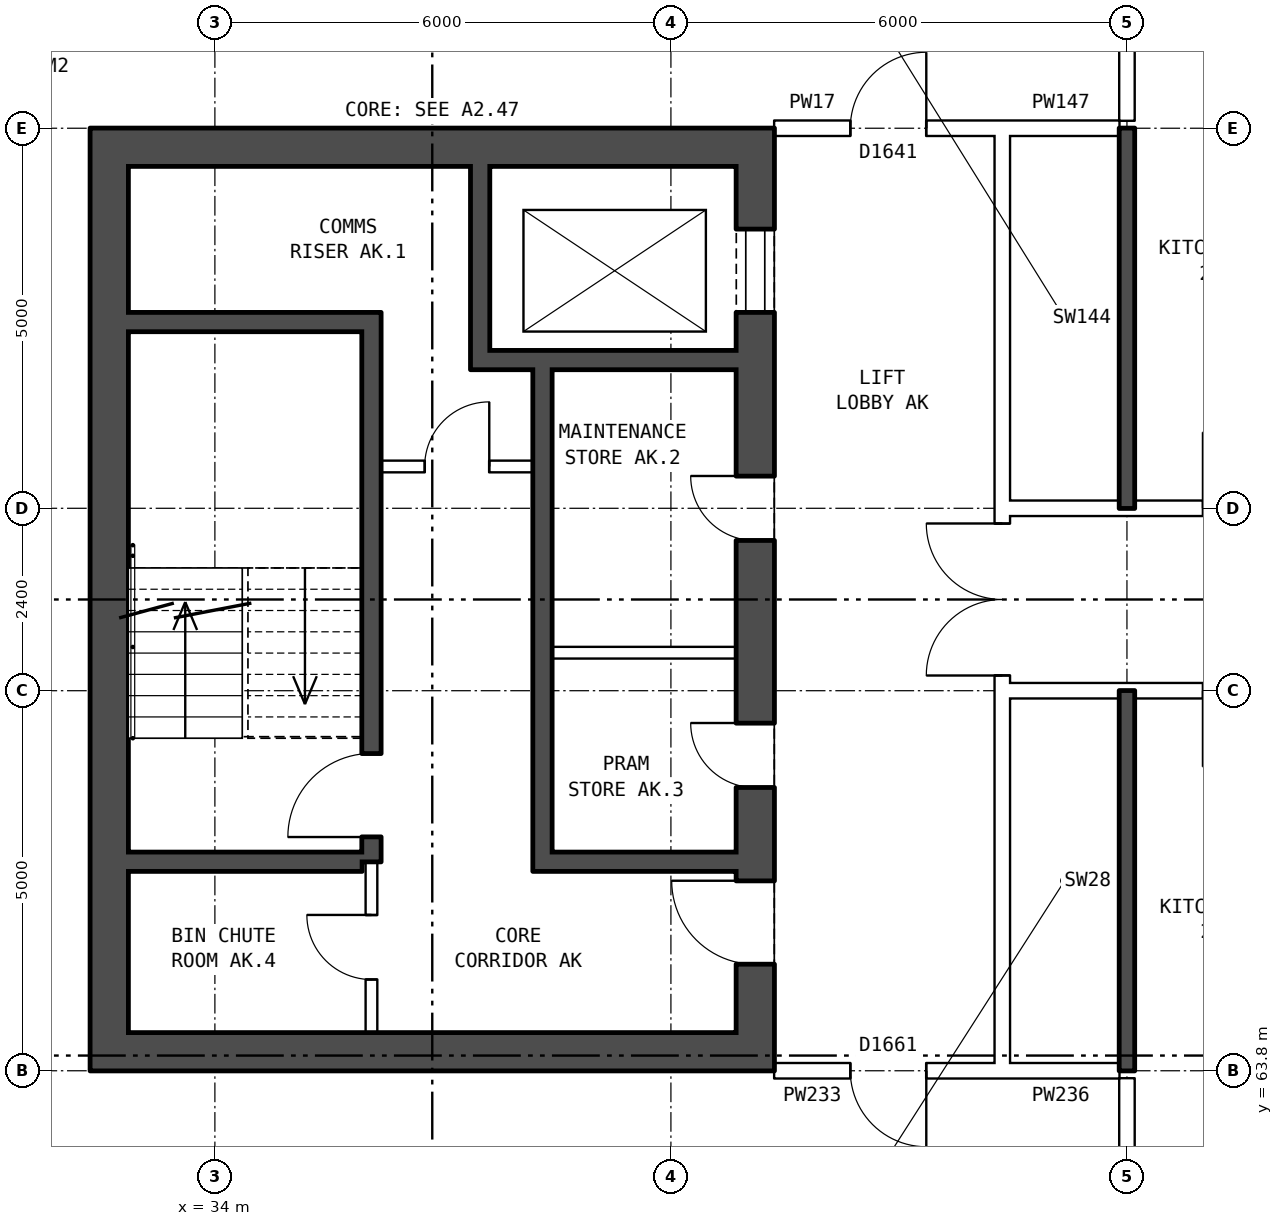
"""IFC4 building model, lengths in metres.
Left out: names, types, materials, properties, quantities, classifications, styles, units other than length and angle.
Written with IfcOpenShell. Run it as: python <this file> out.ifc"""

import sys

from ifc_helpers import new_model, si_unit, direction, frame, frame_2d, origin, place, context, subcontext, project, spatial, rectangle, extrude, element, fill, save


model = new_model("IFC4")
c1 = context("Model", 3, precision=1e-05, world=origin(), true_north=direction((0.0, 1.0)))
c2 = subcontext(c1, "Body", "Model", "MODEL_VIEW")
j1 = project(units=[si_unit("LENGTHUNIT", "METRE"), si_unit("PLANEANGLEUNIT", "RADIAN")], contexts=[c1])
p1 = place(None, origin())
s1 = spatial("IfcSite", under=j1, at=p1, CompositionType="ELEMENT")
p2 = place(p1, origin())
s2 = spatial("IfcBuilding", under=s1, at=p2, CompositionType="ELEMENT")
p3 = place(p2, frame((0.0, 0.0, 164.0)))
s3 = spatial("IfcBuildingStorey", under=s2, at=p3, CompositionType="ELEMENT", Elevation=164.0)
p4 = place(p3, frame((41.11, 76.2, 0.0), z_axis=(0.0, 0.0, 1.0), x_axis=(0.0, -1.0, 0.0)))
e1 = element("IfcWall", 1, at=p4, inside=s3, PredefinedType="SHEAR", context=c2, shape_type="SweptSolid", body=[
    extrude(rectangle(XDim=12.4, YDim=0.5, at=frame_2d((6.2, 0.0))), origin(), (0.0, 0.0, 1.0), 2.85),
])
p5 = place(p4, frame((1.325, 0.0, 0.0)))
e2 = element("IfcOpeningElement", 2, at=p5, cuts=e1, PredefinedType="OPENING", context=c2, shape_type="SweptSolid", body=[
    extrude(rectangle(XDim=1.1, YDim=2.1, at=frame_2d((0.55, 1.05))), frame((0.0, 0.26, 0.0), z_axis=(0.0, -1.0, 0.0), x_axis=(1.0, 0.0, 0.0)), (0.0, 0.0, 1.0), 0.52),
])
p6 = place(p4, frame((4.575, 0.0, 0.0)))
e3 = element("IfcOpeningElement", 3, at=p6, cuts=e1, PredefinedType="OPENING", context=c2, shape_type="SweptSolid", body=[
    extrude(rectangle(XDim=0.85, YDim=2.1, at=frame_2d((0.425, 1.05))), frame((0.0, 0.26, 0.0), z_axis=(0.0, -1.0, 0.0), x_axis=(1.0, 0.0, 0.0)), (0.0, 0.0, 1.0), 0.52),
])
p7 = place(p4, frame((7.825, 0.0, 0.0)))
e4 = element("IfcOpeningElement", 4, at=p7, cuts=e1, PredefinedType="OPENING", context=c2, shape_type="SweptSolid", body=[
    extrude(rectangle(XDim=0.85, YDim=2.1, at=frame_2d((0.425, 1.05))), frame((0.0, 0.26, 0.0), z_axis=(0.0, -1.0, 0.0), x_axis=(1.0, 0.0, 0.0)), (0.0, 0.0, 1.0), 0.52),
])
p8 = place(p4, frame((9.9, 0.0, 0.0)))
e5 = element("IfcOpeningElement", 5, at=p8, cuts=e1, PredefinedType="OPENING", context=c2, shape_type="SweptSolid", body=[
    extrude(rectangle(XDim=1.1, YDim=2.1, at=frame_2d((0.55, 1.05))), frame((0.0, 0.26, 0.0), z_axis=(0.0, -1.0, 0.0), x_axis=(1.0, 0.0, 0.0)), (0.0, 0.0, 1.0), 0.52),
])
p9 = place(p3, frame((32.61, 76.2, 0.0), z_axis=(0.0, 0.0, 1.0), x_axis=(0.0, -1.0, 0.0)))
e6 = element("IfcWall", 6, at=p9, inside=s3, PredefinedType="SHEAR", context=c2, shape_type="SweptSolid", body=[
    extrude(rectangle(XDim=12.4, YDim=0.5, at=frame_2d((6.2, 0.0))), origin(), (0.0, 0.0, 1.0), 2.85),
])
for number, where, z_axis, x_axis in (
    (7, (40.86, 75.95, 0.0), (0.0, 0.0, 1.0), (-1.0, 0.0, 0.0)),
    (8, (40.86, 64.05, 0.0), (0.0, 0.0, 1.0), (-1.0, 0.0, 0.0)),
):
    element("IfcWall", number, at=place(p3, frame(where, z_axis=z_axis, x_axis=x_axis)), inside=s3, PredefinedType="SHEAR", context=c2, shape_type="SweptSolid", body=[
        extrude(rectangle(XDim=8.0, YDim=0.5, at=frame_2d((4.0, 0.0))), origin(), (0.0, 0.0, 1.0), 2.85),
    ])
p10 = place(p3, frame((35.935, 73.65, 0.0), z_axis=(0.0, 0.0, 1.0), x_axis=(-1.0, 0.0, 0.0)))
e9 = element("IfcWall", 9, at=p10, inside=s3, PredefinedType="SHEAR", context=c2, shape_type="SweptSolid", body=[
    extrude(rectangle(XDim=3.075, YDim=0.25, at=frame_2d((1.538, 0.0))), origin(), (0.0, 0.0, 1.0), 2.85),
])
p11 = place(p3, frame((40.86, 73.15, 0.0), z_axis=(0.0, 0.0, 1.0), x_axis=(-1.0, 0.0, 0.0)))
e10 = element("IfcWall", 10, at=p11, inside=s3, PredefinedType="SHEAR", context=c2, shape_type="SweptSolid", body=[
    extrude(rectangle(XDim=3.495, YDim=0.25, at=frame_2d((1.748, 0.0))), origin(), (0.0, 0.0, 1.0), 2.85),
])
p12 = place(p3, frame((38.185, 71.75, 0.0), z_axis=(0.0, 0.0, 1.0), x_axis=(-1.0, 0.0, 0.0)))
e11 = element("IfcWall", 11, at=p12, inside=s3, PredefinedType="PARTITIONING", context=c2, shape_type="SweptSolid", body=[
    extrude(rectangle(XDim=2.0, YDim=0.15, at=frame_2d((1.0, 0.0))), origin(), (0.0, 0.0, 1.0), 2.85),
])
p13 = place(p12, frame((0.575, 0.0, 0.0)))
e12 = element("IfcOpeningElement", 12, at=p13, cuts=e11, PredefinedType="OPENING", context=c2, shape_type="SweptSolid", body=[
    extrude(rectangle(XDim=0.85, YDim=2.1, at=frame_2d((0.425, 1.05))), frame((0.0, 0.085, 0.0), z_axis=(0.0, -1.0, 0.0), x_axis=(1.0, 0.0, 0.0)), (0.0, 0.0, 1.0), 0.17),
])
p14 = place(p3, frame((40.86, 69.3, 0.0), z_axis=(0.0, 0.0, 1.0), x_axis=(-1.0, 0.0, 0.0)))
e13 = element("IfcWall", 13, at=p14, inside=s3, PredefinedType="PARTITIONING", context=c2, shape_type="SweptSolid", body=[
    extrude(rectangle(XDim=2.425, YDim=0.15, at=frame_2d((1.212, 0.0))), origin(), (0.0, 0.0, 1.0), 2.85),
])
p15 = place(p3, frame((40.86, 66.55, 0.0), z_axis=(0.0, 0.0, 1.0), x_axis=(-1.0, 0.0, 0.0)))
e14 = element("IfcWall", 14, at=p15, inside=s3, PredefinedType="SHEAR", context=c2, shape_type="SweptSolid", body=[
    extrude(rectangle(XDim=2.425, YDim=0.25, at=frame_2d((1.212, 0.0))), origin(), (0.0, 0.0, 1.0), 2.85),
])
p16 = place(p3, frame((35.935, 66.55, 0.0), z_axis=(0.0, 0.0, 1.0), x_axis=(-1.0, 0.0, 0.0)))
e15 = element("IfcWall", 15, at=p16, inside=s3, PredefinedType="SHEAR", context=c2, shape_type="SweptSolid", body=[
    extrude(rectangle(XDim=3.075, YDim=0.25, at=frame_2d((1.538, 0.0))), origin(), (0.0, 0.0, 1.0), 2.85),
])
p17 = place(p3, frame((38.31, 73.025, 0.0), z_axis=(0.0, 0.0, 1.0), x_axis=(0.0, -1.0, 0.0)))
e16 = element("IfcWall", 16, at=p17, inside=s3, PredefinedType="SHEAR", context=c2, shape_type="SweptSolid", body=[
    extrude(rectangle(XDim=6.6, YDim=0.25, at=frame_2d((3.3, 0.0))), origin(), (0.0, 0.0, 1.0), 2.85),
])
p18 = place(p3, frame((37.49, 75.7, 0.0), z_axis=(0.0, 0.0, 1.0), x_axis=(0.0, -1.0, 0.0)))
e17 = element("IfcWall", 17, at=p18, inside=s3, PredefinedType="SHEAR", context=c2, shape_type="SweptSolid", body=[
    extrude(rectangle(XDim=2.425, YDim=0.25, at=frame_2d((1.212, 0.0))), origin(), (0.0, 0.0, 1.0), 2.85),
])
p19 = place(p3, frame((36.06, 73.775, 0.0), z_axis=(0.0, 0.0, 1.0), x_axis=(0.0, -1.0, 0.0)))
e18 = element("IfcWall", 18, at=p19, inside=s3, PredefinedType="SHEAR", context=c2, shape_type="SweptSolid", body=[
    extrude(rectangle(XDim=7.225, YDim=0.25, at=frame_2d((3.612, 0.0))), origin(), (0.0, 0.0, 1.0), 2.85),
])
p20 = place(p19, frame((5.8, 0.0, 0.0)))
e19 = element("IfcOpeningElement", 19, at=p20, cuts=e18, PredefinedType="OPENING", context=c2, shape_type="SweptSolid", body=[
    extrude(rectangle(XDim=1.1, YDim=2.1, at=frame_2d((0.55, 1.05))), frame((0.0, 0.135, 0.0), z_axis=(0.0, -1.0, 0.0), x_axis=(1.0, 0.0, 0.0)), (0.0, 0.0, 1.0), 0.27),
])
p21 = place(p3, frame((36.06, 66.55, 0.0), z_axis=(0.0, 0.0, 1.0), x_axis=(0.0, -1.0, 0.0)))
e20 = element("IfcWall", 20, at=p21, inside=s3, PredefinedType="PARTITIONING", context=c2, shape_type="SweptSolid", body=[
    extrude(rectangle(XDim=2.25, YDim=0.15, at=frame_2d((1.125, 0.0))), origin(), (0.0, 0.0, 1.0), 2.85),
])
p22 = place(p21, frame((0.7, 0.0, 0.0)))
e21 = element("IfcOpeningElement", 21, at=p22, cuts=e20, PredefinedType="OPENING", context=c2, shape_type="SweptSolid", body=[
    extrude(rectangle(XDim=0.85, YDim=2.1, at=frame_2d((0.425, 1.05))), frame((0.0, 0.085, 0.0), z_axis=(0.0, -1.0, 0.0), x_axis=(1.0, 0.0, 0.0)), (0.0, 0.0, 1.0), 0.17),
])
p23 = place(p3, frame((44.36, 63.9, 0.0), z_axis=(0.0, 0.0, 1.0), x_axis=(0.0, 1.0, 0.0)))
e22 = element("IfcWall", 22, at=p23, inside=s3, PredefinedType="PARTITIONING", context=c2, shape_type="SweptSolid", body=[
    extrude(rectangle(XDim=12.2, YDim=0.2, at=frame_2d((6.1, 0.0))), origin(), (0.0, 0.0, 1.0), 2.85),
])
p24 = place(p23, frame((5.1, 0.0, 0.0)))
e23 = element("IfcOpeningElement", 23, at=p24, cuts=e22, PredefinedType="OPENING", context=c2, shape_type="SweptSolid", body=[
    extrude(rectangle(XDim=2.0, YDim=2.1, at=frame_2d((1.0, 1.05))), frame((0.0, 0.11, 0.0), z_axis=(0.0, -1.0, 0.0), x_axis=(1.0, 0.0, 0.0)), (0.0, 0.0, 1.0), 0.22),
])
p25 = place(p3, frame((41.36, 63.8, 0.0), z_axis=(0.0, 0.0, 1.0), x_axis=(1.0, 0.0, 0.0)))
e24 = element("IfcWall", 24, at=p25, inside=s3, PredefinedType="PARTITIONING", context=c2, shape_type="SweptSolid", body=[
    extrude(rectangle(XDim=3.0, YDim=0.2, at=frame_2d((1.5, 0.0))), origin(), (0.0, 0.0, 1.0), 2.85),
])
p26 = place(p25, frame((1.0, 0.0, 0.0)))
e25 = element("IfcOpeningElement", 25, at=p26, cuts=e24, PredefinedType="OPENING", context=c2, shape_type="SweptSolid", body=[
    extrude(rectangle(XDim=1.0, YDim=2.1, at=frame_2d((0.5, 1.05))), frame((0.0, 0.11, 0.0), z_axis=(0.0, -1.0, 0.0), x_axis=(1.0, 0.0, 0.0)), (0.0, 0.0, 1.0), 0.22),
])
p27 = place(p3, frame((44.36, 63.8, 0.0), z_axis=(0.0, 0.0, 1.0), x_axis=(1.0, 0.0, 0.0)))
e26 = element("IfcWall", 26, at=p27, inside=s3, PredefinedType="PARTITIONING", context=c2, shape_type="SweptSolid", body=[
    extrude(rectangle(XDim=1.54, YDim=0.2, at=frame_2d((0.77, 0.0))), origin(), (0.0, 0.0, 1.0), 2.85),
])
p28 = place(p3, frame((44.36, 68.8, 0.0), z_axis=(0.0, 0.0, 1.0), x_axis=(1.0, 0.0, 0.0)))
e27 = element("IfcWall", 27, at=p28, inside=s3, PredefinedType="PARTITIONING", context=c2, shape_type="SweptSolid", body=[
    extrude(rectangle(XDim=19.28, YDim=0.2, at=frame_2d((9.64, 0.0))), origin(), (0.0, 0.0, 1.0), 2.85),
])
p29 = place(p28, frame((17.46, 0.0, 0.0)))
e28 = element("IfcOpeningElement", 28, at=p29, cuts=e27, PredefinedType="OPENING", context=c2, shape_type="SweptSolid", body=[
    extrude(rectangle(XDim=1.0, YDim=2.1, at=frame_2d((0.5, 1.05))), frame((0.0, 0.11, 0.0), z_axis=(0.0, -1.0, 0.0), x_axis=(1.0, 0.0, 0.0)), (0.0, 0.0, 1.0), 0.22),
])
p30 = place(p28, frame((8.64, 0.0, 0.0)))
e29 = element("IfcOpeningElement", 29, at=p30, cuts=e27, PredefinedType="OPENING", context=c2, shape_type="SweptSolid", body=[
    extrude(rectangle(XDim=1.0, YDim=2.1, at=frame_2d((0.5, 1.05))), frame((0.0, 0.11, 0.0), z_axis=(0.0, -1.0, 0.0), x_axis=(1.0, 0.0, 0.0)), (0.0, 0.0, 1.0), 0.22),
])
p31 = place(p28, frame((2.64, 0.0, 0.0)))
e30 = element("IfcOpeningElement", 30, at=p31, cuts=e27, PredefinedType="OPENING", context=c2, shape_type="SweptSolid", body=[
    extrude(rectangle(XDim=1.0, YDim=2.1, at=frame_2d((0.5, 1.05))), frame((0.0, 0.11, 0.0), z_axis=(0.0, -1.0, 0.0), x_axis=(1.0, 0.0, 0.0)), (0.0, 0.0, 1.0), 0.22),
])
p32 = place(p3, frame((44.36, 71.2, 0.0), z_axis=(0.0, 0.0, 1.0), x_axis=(1.0, 0.0, 0.0)))
e31 = element("IfcWall", 31, at=p32, inside=s3, PredefinedType="PARTITIONING", context=c2, shape_type="SweptSolid", body=[
    extrude(rectangle(XDim=19.28, YDim=0.2, at=frame_2d((9.64, 0.0))), origin(), (0.0, 0.0, 1.0), 2.85),
])
p33 = place(p32, frame((17.46, 0.0, 0.0)))
e32 = element("IfcOpeningElement", 32, at=p33, cuts=e31, PredefinedType="OPENING", context=c2, shape_type="SweptSolid", body=[
    extrude(rectangle(XDim=1.0, YDim=2.1, at=frame_2d((0.5, 1.05))), frame((0.0, 0.11, 0.0), z_axis=(0.0, -1.0, 0.0), x_axis=(1.0, 0.0, 0.0)), (0.0, 0.0, 1.0), 0.22),
])
p34 = place(p32, frame((8.64, 0.0, 0.0)))
e33 = element("IfcOpeningElement", 33, at=p34, cuts=e31, PredefinedType="OPENING", context=c2, shape_type="SweptSolid", body=[
    extrude(rectangle(XDim=1.0, YDim=2.1, at=frame_2d((0.5, 1.05))), frame((0.0, 0.11, 0.0), z_axis=(0.0, -1.0, 0.0), x_axis=(1.0, 0.0, 0.0)), (0.0, 0.0, 1.0), 0.22),
])
p35 = place(p32, frame((2.64, 0.0, 0.0)))
e34 = element("IfcOpeningElement", 34, at=p35, cuts=e31, PredefinedType="OPENING", context=c2, shape_type="SweptSolid", body=[
    extrude(rectangle(XDim=1.0, YDim=2.1, at=frame_2d((0.5, 1.05))), frame((0.0, 0.11, 0.0), z_axis=(0.0, -1.0, 0.0), x_axis=(1.0, 0.0, 0.0)), (0.0, 0.0, 1.0), 0.22),
])
p36 = place(p3, frame((41.36, 76.2, 0.0), z_axis=(0.0, 0.0, 1.0), x_axis=(1.0, 0.0, 0.0)))
e35 = element("IfcWall", 35, at=p36, inside=s3, PredefinedType="PARTITIONING", context=c2, shape_type="SweptSolid", body=[
    extrude(rectangle(XDim=3.0, YDim=0.2, at=frame_2d((1.5, 0.0))), origin(), (0.0, 0.0, 1.0), 2.85),
])
p37 = place(p36, frame((1.0, 0.0, 0.0)))
e36 = element("IfcOpeningElement", 36, at=p37, cuts=e35, PredefinedType="OPENING", context=c2, shape_type="SweptSolid", body=[
    extrude(rectangle(XDim=1.0, YDim=2.1, at=frame_2d((0.5, 1.05))), frame((0.0, 0.11, 0.0), z_axis=(0.0, -1.0, 0.0), x_axis=(1.0, 0.0, 0.0)), (0.0, 0.0, 1.0), 0.22),
])
p38 = place(p3, frame((44.36, 76.2, 0.0), z_axis=(0.0, 0.0, 1.0), x_axis=(1.0, 0.0, 0.0)))
e37 = element("IfcWall", 37, at=p38, inside=s3, PredefinedType="PARTITIONING", context=c2, shape_type="SweptSolid", body=[
    extrude(rectangle(XDim=1.54, YDim=0.2, at=frame_2d((0.77, 0.0))), origin(), (0.0, 0.0, 1.0), 2.85),
])
p39 = place(p3, frame((46.0, 61.5, 0.0), z_axis=(0.0, 0.0, 1.0), x_axis=(0.0, 1.0, 0.0)))
e38 = element("IfcWall", 38, at=p39, inside=s3, PredefinedType="PARTITIONING", context=c2, shape_type="SweptSolid", body=[
    extrude(rectangle(XDim=2.2, YDim=0.2, at=frame_2d((1.1, 0.0))), origin(), (0.0, 0.0, 1.0), 2.85),
])
for number, where, z_axis, x_axis in (
    (39, (46.0, 63.8, 0.0), (0.0, 0.0, 1.0), (0.0, 1.0, 0.0)),
    (40, (46.0, 71.2, 0.0), (0.0, 0.0, 1.0), (0.0, 1.0, 0.0)),
):
    element("IfcWall", number, at=place(p3, frame(where, z_axis=z_axis, x_axis=x_axis)), inside=s3, PredefinedType="SOLIDWALL", context=c2, shape_type="SweptSolid", body=[
        extrude(rectangle(XDim=5.0, YDim=0.2, at=frame_2d((2.5, 0.0))), origin(), (0.0, 0.0, 1.0), 2.85),
    ])
p40 = place(p3, frame((46.0, 76.3, 0.0), z_axis=(0.0, 0.0, 1.0), x_axis=(0.0, 1.0, 0.0)))
e41 = element("IfcWall", 41, at=p40, inside=s3, PredefinedType="PARTITIONING", context=c2, shape_type="SweptSolid", body=[
    extrude(rectangle(XDim=2.2, YDim=0.2, at=frame_2d((1.1, 0.0))), origin(), (0.0, 0.0, 1.0), 2.85),
])
p41 = place(p5, origin())
e42 = element("IfcDoor", 42, at=p41, inside=s3, OperationType="DOUBLE_DOOR_SLIDING", PredefinedType="DOOR", context=c2, shape_type="SweptSolid", body=[
    extrude(rectangle(XDim=1.1, YDim=2.1, at=frame_2d((0.55, 1.05))), frame((0.0, -0.185, 0.0), z_axis=(0.0, -1.0, 0.0), x_axis=(1.0, 0.0, 0.0)), (0.0, 0.0, 1.0), 0.05),
])
fill(e2, e42)
p42 = place(p6, frame((0.85, 0.0, 0.0), z_axis=(0.0, 0.0, 1.0), x_axis=(-1.0, 0.0, 0.0)))
e43 = element("IfcDoor", 43, at=p42, inside=s3, OperationType="SINGLE_SWING_RIGHT", PredefinedType="DOOR", context=c2, shape_type="SweptSolid", body=[
    extrude(rectangle(XDim=0.85, YDim=2.1, at=frame_2d((0.425, 1.05))), frame((0.0, 0.235, 0.0), z_axis=(0.0, -1.0, 0.0), x_axis=(1.0, 0.0, 0.0)), (0.0, 0.0, 1.0), 0.05),
])
fill(e3, e43)
p43 = place(p7, frame((0.85, 0.0, 0.0), z_axis=(0.0, 0.0, 1.0), x_axis=(-1.0, 0.0, 0.0)))
e44 = element("IfcDoor", 44, at=p43, inside=s3, OperationType="SINGLE_SWING_RIGHT", PredefinedType="DOOR", context=c2, shape_type="SweptSolid", body=[
    extrude(rectangle(XDim=0.85, YDim=2.1, at=frame_2d((0.425, 1.05))), frame((0.0, 0.235, 0.0), z_axis=(0.0, -1.0, 0.0), x_axis=(1.0, 0.0, 0.0)), (0.0, 0.0, 1.0), 0.05),
])
fill(e4, e44)
p44 = place(p8, frame((1.1, 0.0, 0.0), z_axis=(0.0, 0.0, 1.0), x_axis=(-1.0, 0.0, 0.0)))
e45 = element("IfcDoor", 45, at=p44, inside=s3, OperationType="SINGLE_SWING_RIGHT", PredefinedType="DOOR", context=c2, shape_type="SweptSolid", body=[
    extrude(rectangle(XDim=1.1, YDim=2.1, at=frame_2d((0.55, 1.05))), frame((0.0, 0.235, 0.0), z_axis=(0.0, -1.0, 0.0), x_axis=(1.0, 0.0, 0.0)), (0.0, 0.0, 1.0), 0.05),
])
fill(e5, e45)
p45 = place(p20, frame((1.1, 0.0, 0.0), z_axis=(0.0, 0.0, 1.0), x_axis=(-1.0, 0.0, 0.0)))
e46 = element("IfcDoor", 46, at=p45, inside=s3, OperationType="SINGLE_SWING_LEFT", PredefinedType="DOOR", context=c2, shape_type="SweptSolid", body=[
    extrude(rectangle(XDim=1.1, YDim=2.1, at=frame_2d((0.55, 1.05))), frame((0.0, 0.025, 0.0), z_axis=(0.0, -1.0, 0.0), x_axis=(1.0, 0.0, 0.0)), (0.0, 0.0, 1.0), 0.05),
])
fill(e19, e46)
p46 = place(p13, frame((0.85, 0.0, 0.0), z_axis=(0.0, 0.0, 1.0), x_axis=(-1.0, 0.0, 0.0)))
e47 = element("IfcDoor", 47, at=p46, inside=s3, OperationType="SINGLE_SWING_RIGHT", PredefinedType="DOOR", context=c2, shape_type="SweptSolid", body=[
    extrude(rectangle(XDim=0.85, YDim=2.1, at=frame_2d((0.425, 1.05))), frame((0.0, 0.025, 0.0), z_axis=(0.0, -1.0, 0.0), x_axis=(1.0, 0.0, 0.0)), (0.0, 0.0, 1.0), 0.05),
])
fill(e12, e47)
p47 = place(p22, frame((0.85, 0.0, 0.0), z_axis=(0.0, 0.0, 1.0), x_axis=(-1.0, 0.0, 0.0)))
e48 = element("IfcDoor", 48, at=p47, inside=s3, OperationType="SINGLE_SWING_RIGHT", PredefinedType="DOOR", context=c2, shape_type="SweptSolid", body=[
    extrude(rectangle(XDim=0.85, YDim=2.1, at=frame_2d((0.425, 1.05))), frame((0.0, 0.025, 0.0), z_axis=(0.0, -1.0, 0.0), x_axis=(1.0, 0.0, 0.0)), (0.0, 0.0, 1.0), 0.05),
])
fill(e21, e48)
p48 = place(p24, origin())
e49 = element("IfcDoor", 49, at=p48, inside=s3, OperationType="DOUBLE_DOOR_SINGLE_SWING", PredefinedType="DOOR", context=c2, shape_type="SweptSolid", body=[
    extrude(rectangle(XDim=2.0, YDim=2.1, at=frame_2d((1.0, 1.05))), frame((0.0, 0.025, 0.0), z_axis=(0.0, -1.0, 0.0), x_axis=(1.0, 0.0, 0.0)), (0.0, 0.0, 1.0), 0.05),
])
fill(e23, e49)
p49 = place(p26, frame((1.0, 0.0, 0.0), z_axis=(0.0, 0.0, 1.0), x_axis=(-1.0, 0.0, 0.0)))
e50 = element("IfcDoor", 50, at=p49, inside=s3, OperationType="SINGLE_SWING_LEFT", PredefinedType="DOOR", context=c2, shape_type="SweptSolid", body=[
    extrude(rectangle(XDim=1.0, YDim=2.1, at=frame_2d((0.5, 1.05))), frame((0.0, 0.025, 0.0), z_axis=(0.0, -1.0, 0.0), x_axis=(1.0, 0.0, 0.0)), (0.0, 0.0, 1.0), 0.05),
])
fill(e25, e50)
p50 = place(p37, origin())
e51 = element("IfcDoor", 51, at=p50, inside=s3, OperationType="SINGLE_SWING_RIGHT", PredefinedType="DOOR", context=c2, shape_type="SweptSolid", body=[
    extrude(rectangle(XDim=1.0, YDim=2.1, at=frame_2d((0.5, 1.05))), frame((0.0, 0.025, 0.0), z_axis=(0.0, -1.0, 0.0), x_axis=(1.0, 0.0, 0.0)), (0.0, 0.0, 1.0), 0.05),
])
fill(e36, e51)
save(model, sys.argv[1])
